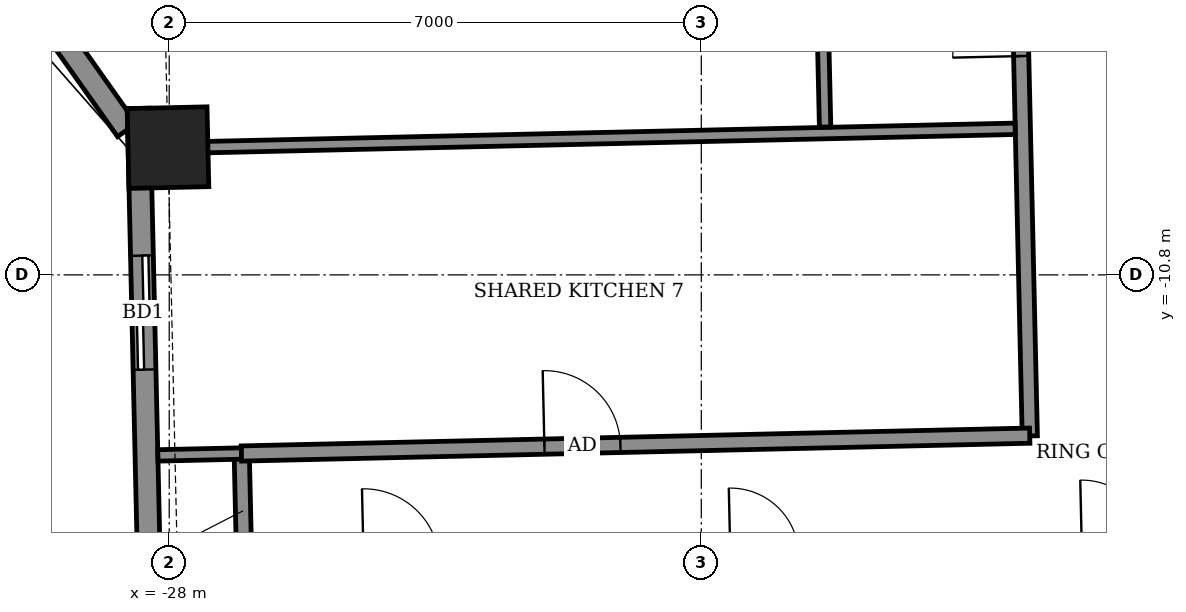
"""IFC4 building model, lengths in metres.
Left out: names, types, materials, properties, quantities, classifications, styles, units other than length and angle.
Written with IfcOpenShell. Run it as: python <this file> out.ifc"""

import sys

from ifc_helpers import new_model, si_unit, direction, frame, frame_2d, origin, origin_2d, place, context, subcontext, project, spatial, rectangle, extrude, element, fill, save


model = new_model("IFC4")
c1 = context("Model", 3, precision=1e-05, world=origin(), true_north=direction((0.0, 1.0)))
c2 = subcontext(c1, "Body", "Model", "MODEL_VIEW")
j1 = project(units=[si_unit("LENGTHUNIT", "METRE"), si_unit("PLANEANGLEUNIT", "RADIAN")], contexts=[c1])
p1 = place(None, origin())
s1 = spatial("IfcSite", under=j1, at=p1, CompositionType="ELEMENT")
p2 = place(p1, origin())
s2 = spatial("IfcBuilding", under=s1, at=p2, CompositionType="ELEMENT")
p3 = place(p2, frame((0.0, 0.0, 249.1)))
s3 = spatial("IfcBuildingStorey", under=s2, at=p3, CompositionType="ELEMENT", Elevation=249.1)
p4 = place(p3, frame((-28.016, -9.126, -0.55), z_axis=(0.0, 0.0, 1.0), x_axis=(0.022671716894, -0.999742963593, 0.0)))
e1 = element("IfcColumn", 1, at=p4, inside=s3, PredefinedType="COLUMN", context=c2, shape_type="SweptSolid", body=[
    extrude(rectangle(XDim=1.05, YDim=1.05, at=origin_2d()), origin(), (0.0, 0.0, 1.0), 3.6),
])
p5 = place(p3, frame((-30.62, -5.982, 0.0), z_axis=(0.0, 0.0, 1.0), x_axis=(0.578108441206, -0.815959943996, 0.0)))
e2 = element("IfcWall", 2, at=p5, inside=s3, PredefinedType="SOLIDWALL", context=c2, shape_type="SweptSolid", body=[
    extrude(rectangle(XDim=3.569, YDim=0.3, at=frame_2d((1.784, 0.0))), origin(), (0.0, 0.0, 1.0), 3.05),
])
p6 = place(p5, frame((0.338, 0.0, 0.9)))
e3 = element("IfcOpeningElement", 3, at=p6, cuts=e2, PredefinedType="OPENING", context=c2, shape_type="SweptSolid", body=[
    extrude(rectangle(XDim=1.2, YDim=1.5, at=frame_2d((0.6, 0.75))), frame((0.0, 0.16, 0.0), z_axis=(0.0, -1.0, 0.0), x_axis=(1.0, 0.0, 0.0)), (0.0, 0.0, 1.0), 0.32),
])
p7 = place(p3, frame((-28.403, -8.61, 0.0), z_axis=(0.0, 0.0, 1.0), x_axis=(0.022680342038, -0.999742767958, 0.0)))
e4 = element("IfcWall", 4, at=p7, inside=s3, PredefinedType="SOLIDWALL", context=c2, shape_type="SweptSolid", body=[
    extrude(rectangle(XDim=13.1, YDim=0.3, at=frame_2d((6.55, 0.0))), origin(), (0.0, 0.0, 1.0), 2.55),
])
p8 = place(p7, frame((1.937, 0.0, 0.0)))
e5 = element("IfcOpeningElement", 5, at=p8, cuts=e4, PredefinedType="OPENING", context=c2, shape_type="SweptSolid", body=[
    extrude(rectangle(XDim=1.5, YDim=2.4, at=frame_2d((0.75, 1.2))), frame((0.0, 0.16, 0.0), z_axis=(0.0, -1.0, 0.0), x_axis=(1.0, 0.0, 0.0)), (0.0, 0.0, 1.0), 0.32),
])
p9 = place(p7, frame((8.611, 0.0, 0.9)))
e6 = element("IfcOpeningElement", 6, at=p9, cuts=e4, PredefinedType="OPENING", context=c2, shape_type="SweptSolid", body=[
    extrude(rectangle(XDim=2.4, YDim=1.5, at=frame_2d((1.2, 0.75))), frame((0.0, 0.16, 0.0), z_axis=(0.0, -1.0, 0.0), x_axis=(1.0, 0.0, 0.0)), (0.0, 0.0, 1.0), 0.32),
])
p10 = place(p3, frame((-27.012, -14.654, 0.0), z_axis=(0.0, 0.0, 1.0), x_axis=(-0.022617910375, 0.999744182344, 0.0)))
e7 = element("IfcWall", 7, at=p10, inside=s3, PredefinedType="PARTITIONING", context=c2, shape_type="SweptSolid", body=[
    extrude(rectangle(XDim=1.5, YDim=0.2, at=frame_2d((0.75, 0.0))), origin(), (0.0, 0.0, 1.0), 3.05),
])
p11 = place(p3, frame((-27.016, -14.65, 0.0), z_axis=(0.0, 0.0, 1.0), x_axis=(0.999742874861, 0.022675629315, 0.0)))
e8 = element("IfcWall", 8, at=p11, inside=s3, PredefinedType="PARTITIONING", context=c2, shape_type="SweptSolid", body=[
    extrude(rectangle(XDim=50.883, YDim=0.2, at=frame_2d((25.442, 0.0))), origin(), (0.0, 0.0, 1.0), 3.05),
])
p12 = place(p11, frame((1.575, 0.0, 0.0)))
e9 = element("IfcOpeningElement", 9, at=p12, cuts=e8, PredefinedType="OPENING", context=c2, shape_type="SweptSolid", body=[
    extrude(rectangle(XDim=1.0, YDim=2.1, at=frame_2d((0.5, 1.05))), frame((0.0, 0.11, 0.0), z_axis=(0.0, -1.0, 0.0), x_axis=(1.0, 0.0, 0.0)), (0.0, 0.0, 1.0), 0.22),
])
p13 = place(p11, frame((6.4, 0.0, 0.0)))
e10 = element("IfcOpeningElement", 10, at=p13, cuts=e8, PredefinedType="OPENING", context=c2, shape_type="SweptSolid", body=[
    extrude(rectangle(XDim=0.9, YDim=2.1, at=frame_2d((0.45, 1.05))), frame((0.0, 0.11, 0.0), z_axis=(0.0, -1.0, 0.0), x_axis=(1.0, 0.0, 0.0)), (0.0, 0.0, 1.0), 0.22),
])
p14 = place(p11, frame((11.025, 0.0, 0.0)))
e11 = element("IfcOpeningElement", 11, at=p14, cuts=e8, PredefinedType="OPENING", context=c2, shape_type="SweptSolid", body=[
    extrude(rectangle(XDim=0.9, YDim=2.1, at=frame_2d((0.45, 1.05))), frame((0.0, 0.11, 0.0), z_axis=(0.0, -1.0, 0.0), x_axis=(1.0, 0.0, 0.0)), (0.0, 0.0, 1.0), 0.22),
])
p15 = place(p11, frame((12.925, 0.0, 0.0)))
e12 = element("IfcOpeningElement", 12, at=p15, cuts=e8, PredefinedType="OPENING", context=c2, shape_type="SweptSolid", body=[
    extrude(rectangle(XDim=0.9, YDim=2.1, at=frame_2d((0.45, 1.05))), frame((0.0, 0.11, 0.0), z_axis=(0.0, -1.0, 0.0), x_axis=(1.0, 0.0, 0.0)), (0.0, 0.0, 1.0), 0.22),
])
p16 = place(p11, frame((19.65, 0.0, 0.0)))
e13 = element("IfcOpeningElement", 13, at=p16, cuts=e8, PredefinedType="OPENING", context=c2, shape_type="SweptSolid", body=[
    extrude(rectangle(XDim=0.9, YDim=2.1, at=frame_2d((0.45, 1.05))), frame((0.0, 0.11, 0.0), z_axis=(0.0, -1.0, 0.0), x_axis=(1.0, 0.0, 0.0)), (0.0, 0.0, 1.0), 0.22),
])
p17 = place(p11, frame((21.575, 0.0, 0.0)))
e14 = element("IfcOpeningElement", 14, at=p17, cuts=e8, PredefinedType="OPENING", context=c2, shape_type="SweptSolid", body=[
    extrude(rectangle(XDim=0.9, YDim=2.1, at=frame_2d((0.45, 1.05))), frame((0.0, 0.11, 0.0), z_axis=(0.0, -1.0, 0.0), x_axis=(1.0, 0.0, 0.0)), (0.0, 0.0, 1.0), 0.22),
])
p18 = place(p11, frame((28.25, 0.0, 0.0)))
e15 = element("IfcOpeningElement", 15, at=p18, cuts=e8, PredefinedType="OPENING", context=c2, shape_type="SweptSolid", body=[
    extrude(rectangle(XDim=0.9, YDim=2.1, at=frame_2d((0.45, 1.05))), frame((0.0, 0.11, 0.0), z_axis=(0.0, -1.0, 0.0), x_axis=(1.0, 0.0, 0.0)), (0.0, 0.0, 1.0), 0.22),
])
p19 = place(p11, frame((30.125, 0.0, 0.0)))
e16 = element("IfcOpeningElement", 16, at=p19, cuts=e8, PredefinedType="OPENING", context=c2, shape_type="SweptSolid", body=[
    extrude(rectangle(XDim=0.9, YDim=2.1, at=frame_2d((0.45, 1.05))), frame((0.0, 0.11, 0.0), z_axis=(0.0, -1.0, 0.0), x_axis=(1.0, 0.0, 0.0)), (0.0, 0.0, 1.0), 0.22),
])
p20 = place(p11, frame((36.9, 0.0, 0.0)))
e17 = element("IfcOpeningElement", 17, at=p20, cuts=e8, PredefinedType="OPENING", context=c2, shape_type="SweptSolid", body=[
    extrude(rectangle(XDim=0.9, YDim=2.1, at=frame_2d((0.45, 1.05))), frame((0.0, 0.11, 0.0), z_axis=(0.0, -1.0, 0.0), x_axis=(1.0, 0.0, 0.0)), (0.0, 0.0, 1.0), 0.22),
])
p21 = place(p11, frame((38.85, 0.0, 0.0)))
e18 = element("IfcOpeningElement", 18, at=p21, cuts=e8, PredefinedType="OPENING", context=c2, shape_type="SweptSolid", body=[
    extrude(rectangle(XDim=0.9, YDim=2.1, at=frame_2d((0.45, 1.05))), frame((0.0, 0.11, 0.0), z_axis=(0.0, -1.0, 0.0), x_axis=(1.0, 0.0, 0.0)), (0.0, 0.0, 1.0), 0.22),
])
p22 = place(p11, frame((48.629, 0.0, 0.0)))
e19 = element("IfcOpeningElement", 19, at=p22, cuts=e8, PredefinedType="OPENING", context=c2, shape_type="SweptSolid", body=[
    extrude(rectangle(XDim=1.0, YDim=2.1, at=frame_2d((0.5, 1.05))), frame((0.0, 0.11, 0.0), z_axis=(0.0, -1.0, 0.0), x_axis=(1.0, 0.0, 0.0)), (0.0, 0.0, 1.0), 0.22),
])
p23 = place(p11, frame((43.6, 0.0, 0.0)))
e20 = element("IfcOpeningElement", 20, at=p23, cuts=e8, PredefinedType="OPENING", context=c2, shape_type="SweptSolid", body=[
    extrude(rectangle(XDim=0.9, YDim=2.1, at=frame_2d((0.45, 1.05))), frame((0.0, 0.11, 0.0), z_axis=(0.0, -1.0, 0.0), x_axis=(1.0, 0.0, 0.0)), (0.0, 0.0, 1.0), 0.22),
])
p24 = place(p3, frame((-16.678, -12.919, 0.0), z_axis=(0.0, 0.0, 1.0), x_axis=(-0.022696191528, 0.999742408268, 0.0)))
e21 = element("IfcWall", 21, at=p24, inside=s3, PredefinedType="PARTITIONING", context=c2, shape_type="SweptSolid", body=[
    extrude(rectangle(XDim=25.074, YDim=0.2, at=frame_2d((12.537, 0.0))), origin(), (0.0, 0.0, 1.0), 3.05),
])
p25 = place(p24, frame((19.537, 0.0, 0.0)))
e22 = element("IfcOpeningElement", 22, at=p25, cuts=e21, PredefinedType="OPENING", context=c2, shape_type="SweptSolid", body=[
    extrude(rectangle(XDim=1.0, YDim=2.1, at=frame_2d((0.5, 1.05))), frame((0.0, 0.11, 0.0), z_axis=(0.0, -1.0, 0.0), x_axis=(1.0, 0.0, 0.0)), (0.0, 0.0, 1.0), 0.22),
])
p26 = place(p24, frame((23.224, 0.0, 0.0)))
e23 = element("IfcOpeningElement", 23, at=p26, cuts=e21, PredefinedType="OPENING", context=c2, shape_type="SweptSolid", body=[
    extrude(rectangle(XDim=0.9, YDim=2.1, at=frame_2d((0.45, 1.05))), frame((0.0, 0.11, 0.0), z_axis=(0.0, -1.0, 0.0), x_axis=(1.0, 0.0, 0.0)), (0.0, 0.0, 1.0), 0.22),
])
p27 = place(p24, frame((13.849, 0.0, 0.0)))
e24 = element("IfcOpeningElement", 24, at=p27, cuts=e21, PredefinedType="OPENING", context=c2, shape_type="SweptSolid", body=[
    extrude(rectangle(XDim=1.0, YDim=2.1, at=frame_2d((0.5, 1.05))), frame((0.0, 0.11, 0.0), z_axis=(0.0, -1.0, 0.0), x_axis=(1.0, 0.0, 0.0)), (0.0, 0.0, 1.0), 0.22),
])
p28 = place(p24, frame((16.149, 0.0, 0.0)))
e25 = element("IfcOpeningElement", 25, at=p28, cuts=e21, PredefinedType="OPENING", context=c2, shape_type="SweptSolid", body=[
    extrude(rectangle(XDim=0.9, YDim=2.1, at=frame_2d((0.45, 1.05))), frame((0.0, 0.11, 0.0), z_axis=(0.0, -1.0, 0.0), x_axis=(1.0, 0.0, 0.0)), (0.0, 0.0, 1.0), 0.22),
])
p29 = place(p24, frame((11.849, 0.0, 0.0)))
e26 = element("IfcOpeningElement", 26, at=p29, cuts=e21, PredefinedType="OPENING", context=c2, shape_type="SweptSolid", body=[
    extrude(rectangle(XDim=1.0, YDim=2.1, at=frame_2d((0.5, 1.05))), frame((0.0, 0.11, 0.0), z_axis=(0.0, -1.0, 0.0), x_axis=(1.0, 0.0, 0.0)), (0.0, 0.0, 1.0), 0.22),
])
p30 = place(p24, frame((9.649, 0.0, 0.0)))
e27 = element("IfcOpeningElement", 27, at=p30, cuts=e21, PredefinedType="OPENING", context=c2, shape_type="SweptSolid", body=[
    extrude(rectangle(XDim=0.9, YDim=2.1, at=frame_2d((0.45, 1.05))), frame((0.0, 0.11, 0.0), z_axis=(0.0, -1.0, 0.0), x_axis=(1.0, 0.0, 0.0)), (0.0, 0.0, 1.0), 0.22),
])
p31 = place(p24, frame((7.324, 0.0, 0.0)))
e28 = element("IfcOpeningElement", 28, at=p31, cuts=e21, PredefinedType="OPENING", context=c2, shape_type="SweptSolid", body=[
    extrude(rectangle(XDim=1.0, YDim=2.1, at=frame_2d((0.5, 1.05))), frame((0.0, 0.11, 0.0), z_axis=(0.0, -1.0, 0.0), x_axis=(1.0, 0.0, 0.0)), (0.0, 0.0, 1.0), 0.22),
])
p32 = place(p24, frame((4.999, 0.0, 0.0)))
e29 = element("IfcOpeningElement", 29, at=p32, cuts=e21, PredefinedType="OPENING", context=c2, shape_type="SweptSolid", body=[
    extrude(rectangle(XDim=0.9, YDim=2.1, at=frame_2d((0.45, 1.05))), frame((0.0, 0.11, 0.0), z_axis=(0.0, -1.0, 0.0), x_axis=(1.0, 0.0, 0.0)), (0.0, 0.0, 1.0), 0.22),
])
p33 = place(p3, frame((-28.149, -13.175, 0.0), z_axis=(0.0, 0.0, 1.0), x_axis=(0.999740233734, 0.022791776024, 0.0)))
e30 = element("IfcWall", 30, at=p33, inside=s3, PredefinedType="PARTITIONING", context=c2, shape_type="SweptSolid", body=[
    extrude(rectangle(XDim=1.103, YDim=0.15, at=frame_2d((0.552, 0.0))), origin(), (0.0, 0.0, 1.0), 2.55),
])
p34 = place(p3, frame((-27.05, -13.15, 0.0), z_axis=(0.0, 0.0, 1.0), x_axis=(0.999743679035, 0.022640146404, 0.0)))
e31 = element("IfcWall", 31, at=p34, inside=s3, PredefinedType="PARTITIONING", context=c2, shape_type="SweptSolid", body=[
    extrude(rectangle(XDim=10.374, YDim=0.2, at=frame_2d((5.187, 0.0))), origin(), (0.0, 0.0, 1.0), 3.05),
])
p35 = place(p34, frame((3.987, 0.0, 0.0)))
e32 = element("IfcOpeningElement", 32, at=p35, cuts=e31, PredefinedType="OPENING", context=c2, shape_type="SweptSolid", body=[
    extrude(rectangle(XDim=1.0, YDim=2.1, at=frame_2d((0.5, 1.05))), frame((0.0, 0.11, 0.0), z_axis=(0.0, -1.0, 0.0), x_axis=(1.0, 0.0, 0.0)), (0.0, 0.0, 1.0), 0.22),
])
p36 = place(p3, frame((-28.241, -9.136, 0.0), z_axis=(0.0, 0.0, 1.0), x_axis=(0.999742533279, 0.022690684282, 0.0)))
e33 = element("IfcWall", 33, at=p36, inside=s3, PredefinedType="PARTITIONING", context=c2, shape_type="SweptSolid", body=[
    extrude(rectangle(XDim=11.373, YDim=0.15, at=frame_2d((5.687, 0.0))), origin(), (0.0, 0.0, 1.0), 3.05),
])
p37 = place(p3, frame((-19.371, -8.855, 0.0), z_axis=(0.0, 0.0, 1.0), x_axis=(-0.022760079124, 0.999740955847, 0.0)))
e34 = element("IfcWall", 34, at=p37, inside=s3, PredefinedType="PARTITIONING", context=c2, shape_type="SweptSolid", body=[
    extrude(rectangle(XDim=2.725, YDim=0.15, at=frame_2d((1.362, 0.0))), origin(), (0.0, 0.0, 1.0), 3.05),
])
p38 = place(p8, origin())
e35 = element("IfcDoor", 35, at=p38, inside=s3, OperationType="SLIDING_TO_LEFT", PredefinedType="DOOR", context=c2, shape_type="SweptSolid", body=[
    extrude(rectangle(XDim=1.5, YDim=2.4, at=frame_2d((0.75, 1.2))), frame((0.0, 0.025, 0.0), z_axis=(0.0, -1.0, 0.0), x_axis=(1.0, 0.0, 0.0)), (0.0, 0.0, 1.0), 0.05),
])
fill(e5, e35)
p39 = place(p32, origin())
e36 = element("IfcDoor", 36, at=p39, inside=s3, OperationType="SINGLE_SWING_RIGHT", PredefinedType="DOOR", context=c2, shape_type="SweptSolid", body=[
    extrude(rectangle(XDim=0.9, YDim=2.1, at=frame_2d((0.45, 1.05))), frame((0.0, 0.025, 0.0), z_axis=(0.0, -1.0, 0.0), x_axis=(1.0, 0.0, 0.0)), (0.0, 0.0, 1.0), 0.05),
])
fill(e29, e36)
p40 = place(p35, origin())
e37 = element("IfcDoor", 37, at=p40, inside=s3, OperationType="SINGLE_SWING_LEFT", PredefinedType="DOOR", context=c2, shape_type="SweptSolid", body=[
    extrude(rectangle(XDim=1.0, YDim=2.1, at=frame_2d((0.5, 1.05))), frame((0.0, 0.025, 0.0), z_axis=(0.0, -1.0, 0.0), x_axis=(1.0, 0.0, 0.0)), (0.0, 0.0, 1.0), 0.05),
])
fill(e32, e37)
save(model, sys.argv[1])
